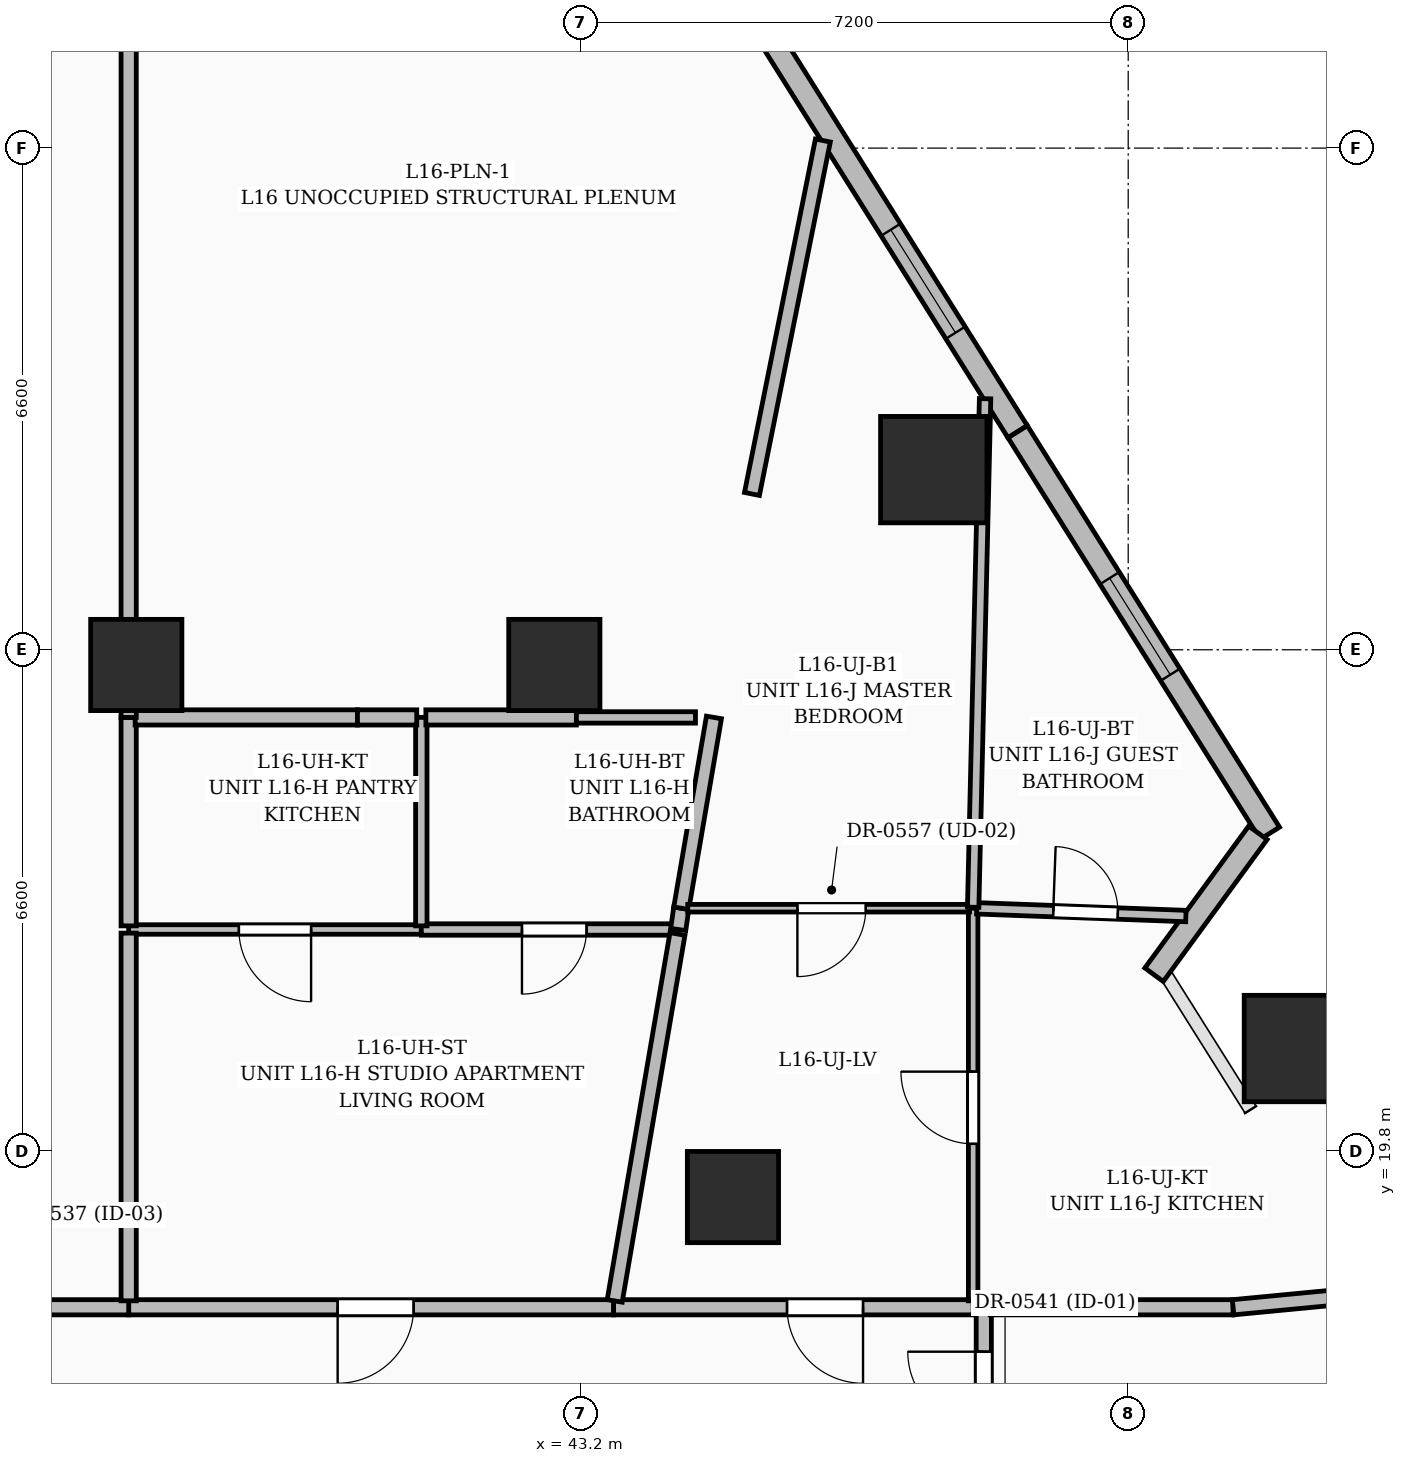
"""IFC4 building model, lengths in metres.
Left out: names, types, materials, properties, quantities, classifications, styles, units other than length and angle.
Written with IfcOpenShell. Run it as: python <this file> out.ifc"""

import sys

from ifc_helpers import new_model, si_unit, direction, frame, frame_2d, origin, origin_2d, place, context, subcontext, project, spatial, rectangle, extrude, element, fill, save


model = new_model("IFC4")
c1 = context("Model", 3, precision=1e-05, world=origin(), true_north=direction((0.0, 1.0)))
c2 = subcontext(c1, "Body", "Model", "MODEL_VIEW")
j1 = project(units=[si_unit("LENGTHUNIT", "METRE"), si_unit("PLANEANGLEUNIT", "RADIAN")], contexts=[c1])
p1 = place(None, origin())
s1 = spatial("IfcSite", under=j1, at=p1, CompositionType="ELEMENT")
p2 = place(p1, origin())
s2 = spatial("IfcBuilding", under=s1, at=p2, CompositionType="ELEMENT")
p3 = place(p2, frame((0.0, 0.0, 67.8)))
s3 = spatial("IfcBuildingStorey", under=s2, at=p3, CompositionType="ELEMENT", Elevation=67.8)
for number, where, z_axis, x_axis in (
    (1, (45.2, 19.2, 0.0), (0.0, 0.0, 1.0), (1.0, 0.0, 0.0)),
    (2, (42.85, 26.2, 0.0), (0.0, 0.0, 1.0), (1.0, 0.0, 0.0)),
    (3, (37.35, 26.2, 0.0), (0.0, 0.0, 1.0), (1.0, 0.0, 0.0)),
):
    element("IfcColumn", number, at=place(p3, frame(where, z_axis=z_axis, x_axis=x_axis)), inside=s3, PredefinedType="COLUMN", context=c2, shape_type="SweptSolid", body=[
        extrude(rectangle(XDim=1.2, YDim=1.2, at=origin_2d()), origin(), (0.0, 0.0, 1.0), 3.6),
    ])
for number, where, z_axis, x_axis in (
    (4, (52.626, 21.154, 0.0), (0.0, 0.0, 1.0), (1.0, 0.0, 0.0)),
    (5, (47.842, 28.77, 0.0), (0.0, 0.0, 1.0), (1.0, 0.0, 0.0)),
):
    element("IfcColumn", number, at=place(p3, frame(where, z_axis=z_axis, x_axis=x_axis)), inside=s3, PredefinedType="COLUMN", context=c2, shape_type="SweptSolid", body=[
        extrude(rectangle(XDim=1.4, YDim=1.4, at=origin_2d()), origin(), (0.0, 0.0, 1.0), 3.6),
    ])
p4 = place(p3, frame((45.627, 34.551, 0.0), z_axis=(0.0, 0.0, 1.0), x_axis=(0.531925449882, -0.846791187819, 0.0)))
e6 = element("IfcWall", 6, at=p4, inside=s3, PredefinedType="SOLIDWALL", context=c2, shape_type="SweptSolid", body=[
    extrude(rectangle(XDim=6.238, YDim=0.3, at=frame_2d((3.119, 0.0))), origin(), (0.0, 0.0, 1.0), 3.35),
])
p5 = place(p4, frame((3.1, 0.0, 0.55)))
e7 = element("IfcOpeningElement", 7, at=p5, cuts=e6, PredefinedType="OPENING", context=c2, shape_type="SweptSolid", body=[
    extrude(rectangle(XDim=1.6, YDim=2.2, at=frame_2d((0.8, 1.1))), frame((0.0, 0.16, 0.0), z_axis=(0.0, -1.0, 0.0), x_axis=(1.0, 0.0, 0.0)), (0.0, 0.0, 1.0), 0.32),
])
p6 = place(p3, frame((48.946, 29.269, 0.0), z_axis=(0.0, 0.0, 1.0), x_axis=(0.531879756562, -0.84681988909, 0.0)))
e8 = element("IfcWall", 8, at=p6, inside=s3, PredefinedType="SOLIDWALL", context=c2, shape_type="SweptSolid", body=[
    extrude(rectangle(XDim=6.238, YDim=0.3, at=frame_2d((3.119, 0.0))), origin(), (0.0, 0.0, 1.0), 3.35),
])
p7 = place(p6, frame((2.275, 0.0, 0.6)))
e9 = element("IfcOpeningElement", 9, at=p7, cuts=e8, PredefinedType="OPENING", context=c2, shape_type="SweptSolid", body=[
    extrude(rectangle(XDim=1.5, YDim=2.1, at=frame_2d((0.75, 1.05))), frame((0.0, 0.16, 0.0), z_axis=(0.0, -1.0, 0.0), x_axis=(1.0, 0.0, 0.0)), (0.0, 0.0, 1.0), 0.32),
])
p8 = place(p3, frame((52.106, 23.992, 0.0), z_axis=(0.0, 0.0, 1.0), x_axis=(-0.590553579903, -0.806998432008, 0.0)))
e10 = element("IfcWall", 10, at=p8, inside=s3, PredefinedType="SOLIDWALL", context=c2, shape_type="SweptSolid", body=[
    extrude(rectangle(XDim=2.313, YDim=0.3, at=frame_2d((1.157, 0.0))), origin(), (0.0, 0.0, 1.0), 2.375),
])
p9 = place(p3, frame((48.5, 15.47, 0.0), z_axis=(0.0, 0.0, 1.0), x_axis=(0.0, 1.0, 0.0)))
e11 = element("IfcWall", 11, at=p9, inside=s3, PredefinedType="PARTITIONING", context=c2, shape_type="SweptSolid", body=[
    extrude(rectangle(XDim=2.28, YDim=0.2, at=frame_2d((1.14, 0.0))), origin(), (0.0, 0.0, 1.0), 2.279),
])
p10 = place(p9, frame((0.696, 0.0, 0.0)))
e12 = element("IfcOpeningElement", 12, at=p10, cuts=e11, PredefinedType="OPENING", context=c2, shape_type="SweptSolid", body=[
    extrude(rectangle(XDim=1.0, YDim=2.2, at=frame_2d((0.5, 1.1))), frame((0.0, 0.11, 0.0), z_axis=(0.0, -1.0, 0.0), x_axis=(1.0, 0.0, 0.0)), (0.0, 0.0, 1.0), 0.22),
])
p11 = place(p3, frame((43.63, 17.75, 0.0), z_axis=(0.0, 0.0, 1.0), x_axis=(-1.0, 0.0, 0.0)))
e13 = element("IfcWall", 13, at=p11, inside=s3, PredefinedType="PARTITIONING", context=c2, shape_type="SweptSolid", body=[
    extrude(rectangle(XDim=6.38, YDim=0.2, at=frame_2d((3.19, 0.0))), origin(), (0.0, 0.0, 1.0), 3.35),
])
p12 = place(p11, frame((2.631, 0.0, 0.0)))
e14 = element("IfcOpeningElement", 14, at=p12, cuts=e13, PredefinedType="OPENING", context=c2, shape_type="SweptSolid", body=[
    extrude(rectangle(XDim=1.0, YDim=2.2, at=frame_2d((0.5, 1.1))), frame((0.0, 0.11, 0.0), z_axis=(0.0, -1.0, 0.0), x_axis=(1.0, 0.0, 0.0)), (0.0, 0.0, 1.0), 0.22),
])
p13 = place(p3, frame((48.36, 17.75, 0.0), z_axis=(0.0, 0.0, 1.0), x_axis=(-1.0, 0.0, 0.0)))
e15 = element("IfcWall", 15, at=p13, inside=s3, PredefinedType="PARTITIONING", context=c2, shape_type="SweptSolid", body=[
    extrude(rectangle(XDim=4.73, YDim=0.2, at=frame_2d((2.365, 0.0))), origin(), (0.0, 0.0, 1.0), 2.309),
])
p14 = place(p13, frame((1.448, 0.0, 0.0)))
e16 = element("IfcOpeningElement", 16, at=p14, cuts=e15, PredefinedType="OPENING", context=c2, shape_type="SweptSolid", body=[
    extrude(rectangle(XDim=1.0, YDim=2.2, at=frame_2d((0.5, 1.1))), frame((0.0, 0.11, 0.0), z_axis=(0.0, -1.0, 0.0), x_axis=(1.0, 0.0, 0.0)), (0.0, 0.0, 1.0), 0.22),
])
p15 = place(p3, frame((37.25, 17.75, 0.0), z_axis=(0.0, 0.0, 1.0), x_axis=(-1.0, 0.0, 0.0)))
e17 = element("IfcWall", 17, at=p15, inside=s3, PredefinedType="PARTITIONING", context=c2, shape_type="SweptSolid", body=[
    extrude(rectangle(XDim=3.19, YDim=0.2, at=frame_2d((1.595, 0.0))), origin(), (0.0, 0.0, 1.0), 2.309),
])
p16 = place(p15, frame((1.086, 0.0, 0.0)))
e18 = element("IfcOpeningElement", 18, at=p16, cuts=e17, PredefinedType="OPENING", context=c2, shape_type="SweptSolid", body=[
    extrude(rectangle(XDim=0.9, YDim=2.1, at=frame_2d((0.45, 1.05))), frame((0.0, 0.11, 0.0), z_axis=(0.0, -1.0, 0.0), x_axis=(1.0, 0.0, 0.0)), (0.0, 0.0, 1.0), 0.22),
])
p17 = place(p3, frame((51.78, 17.75, 0.0), z_axis=(0.0, 0.0, 1.0), x_axis=(-1.0, 0.0, 0.0)))
e19 = element("IfcWall", 19, at=p17, inside=s3, PredefinedType="PARTITIONING", context=c2, shape_type="SweptSolid", body=[
    extrude(rectangle(XDim=3.195, YDim=0.2, at=frame_2d((1.598, 0.0))), origin(), (0.0, 0.0, 1.0), 2.279),
])
p18 = place(p3, frame((55.8, 18.135, 0.0), z_axis=(0.0, 0.0, 1.0), x_axis=(-0.99544506708, -0.095336868139, 0.0)))
e20 = element("IfcWall", 20, at=p18, inside=s3, PredefinedType="PARTITIONING", context=c2, shape_type="SweptSolid", body=[
    extrude(rectangle(XDim=4.038, YDim=0.2, at=frame_2d((2.019, 0.0))), origin(), (0.0, 0.0, 1.0), 2.37),
])
p19 = place(p3, frame((41.1, 22.72, 0.0), z_axis=(0.0, 0.0, 1.0), x_axis=(-1.0, 0.0, 0.0)))
e21 = element("IfcWall", 21, at=p19, inside=s3, PredefinedType="PARTITIONING", context=c2, shape_type="SweptSolid", body=[
    extrude(rectangle(XDim=3.85, YDim=0.125, at=frame_2d((1.925, 0.0))), origin(), (0.0, 0.0, 1.0), 3.35),
])
p20 = place(p19, frame((1.45, 0.0, 0.0)))
e22 = element("IfcOpeningElement", 22, at=p20, cuts=e21, PredefinedType="OPENING", context=c2, shape_type="SweptSolid", body=[
    extrude(rectangle(XDim=0.95, YDim=2.2, at=frame_2d((0.475, 1.1))), frame((0.0, 0.072, 0.0), z_axis=(0.0, -1.0, 0.0), x_axis=(1.0, 0.0, 0.0)), (0.0, 0.0, 1.0), 0.145),
])
p21 = place(p3, frame((44.48, 22.72, 0.0), z_axis=(0.0, 0.0, 1.0), x_axis=(-1.0, 0.0, 0.0)))
e23 = element("IfcWall", 23, at=p21, inside=s3, PredefinedType="PARTITIONING", context=c2, shape_type="SweptSolid", body=[
    extrude(rectangle(XDim=3.38, YDim=0.15, at=frame_2d((1.69, 0.0))), origin(), (0.0, 0.0, 1.0), 2.309),
])
p22 = place(p21, frame((1.206, 0.0, 0.0)))
e24 = element("IfcOpeningElement", 24, at=p22, cuts=e23, PredefinedType="OPENING", context=c2, shape_type="SweptSolid", body=[
    extrude(rectangle(XDim=0.85, YDim=2.1, at=frame_2d((0.425, 1.05))), frame((0.0, 0.085, 0.0), z_axis=(0.0, -1.0, 0.0), x_axis=(1.0, 0.0, 0.0)), (0.0, 0.0, 1.0), 0.17),
])
p23 = place(p3, frame((43.644, 17.834, 0.0), z_axis=(0.0, 0.0, 1.0), x_axis=(0.168601275726, 0.985684335791, 0.0)))
e25 = element("IfcWall", 25, at=p23, inside=s3, PredefinedType="PARTITIONING", context=c2, shape_type="SweptSolid", body=[
    extrude(rectangle(XDim=4.897, YDim=0.2, at=frame_2d((2.449, 0.0))), origin(), (0.0, 0.0, 1.0), 2.309),
])
p24 = place(p3, frame((37.25, 22.673, 0.0), z_axis=(0.0, 0.0, 1.0), x_axis=(0.0, -1.0, 0.0)))
e26 = element("IfcWall", 26, at=p24, inside=s3, PredefinedType="PARTITIONING", context=c2, shape_type="SweptSolid", body=[
    extrude(rectangle(XDim=4.838, YDim=0.2, at=frame_2d((2.419, 0.0))), origin(), (0.0, 0.0, 1.0), 3.35),
])
p25 = place(p3, frame((41.1, 22.768, 0.0), z_axis=(0.0, 0.0, 1.0), x_axis=(0.0, 1.0, 0.0)))
e27 = element("IfcWall", 27, at=p25, inside=s3, PredefinedType="PARTITIONING", context=c2, shape_type="SweptSolid", body=[
    extrude(rectangle(XDim=2.742, YDim=0.15, at=frame_2d((1.371, 0.0))), origin(), (0.0, 0.0, 1.0), 3.35),
])
p26 = place(p3, frame((37.25, 25.51, 0.0), z_axis=(0.0, 0.0, 1.0), x_axis=(0.0, -1.0, 0.0)))
e28 = element("IfcWall", 28, at=p26, inside=s3, PredefinedType="PARTITIONING", context=c2, shape_type="SweptSolid", body=[
    extrude(rectangle(XDim=2.742, YDim=0.2, at=frame_2d((1.371, 0.0))), origin(), (0.0, 0.0, 1.0), 2.309),
])
p27 = place(p3, frame((40.26, 25.51, 0.0), z_axis=(0.0, 0.0, 1.0), x_axis=(-1.0, 0.0, 0.0)))
e29 = element("IfcWall", 29, at=p27, inside=s3, PredefinedType="PARTITIONING", context=c2, shape_type="SweptSolid", body=[
    extrude(rectangle(XDim=2.925, YDim=0.2, at=frame_2d((1.462, 0.0))), origin(), (0.0, 0.0, 1.0), 3.35),
])
p28 = place(p3, frame((44.48, 22.72, 0.0), z_axis=(0.0, 0.0, 1.0), x_axis=(0.141542183877, 0.989932225045, 0.0)))
e30 = element("IfcWall", 30, at=p28, inside=s3, PredefinedType="PARTITIONING", context=c2, shape_type="SweptSolid", body=[
    extrude(rectangle(XDim=0.283, YDim=0.2, at=frame_2d((0.142, 0.0))), origin(), (0.0, 0.0, 1.0), 3.35),
])
p29 = place(p3, frame((44.52, 23.0, 0.0), z_axis=(0.0, 0.0, 1.0), x_axis=(0.168828104549, 0.985645509864, 0.0)))
e31 = element("IfcWall", 31, at=p29, inside=s3, PredefinedType="PARTITIONING", context=c2, shape_type="SweptSolid", body=[
    extrude(rectangle(XDim=2.547, YDim=0.2, at=frame_2d((1.273, 0.0))), origin(), (0.0, 0.0, 1.0), 3.35),
])
p30 = place(p3, frame((43.14, 25.51, 0.0), z_axis=(0.0, 0.0, 1.0), x_axis=(-1.0, 0.0, 0.0)))
e32 = element("IfcWall", 32, at=p30, inside=s3, PredefinedType="PARTITIONING", context=c2, shape_type="SweptSolid", body=[
    extrude(rectangle(XDim=1.98, YDim=0.2, at=frame_2d((0.99, 0.0))), origin(), (0.0, 0.0, 1.0), 2.309),
])
p31 = place(p3, frame((48.36, 17.835, 0.0), z_axis=(0.0, 0.0, 1.0), x_axis=(0.0, 1.0, 0.0)))
e33 = element("IfcWall", 33, at=p31, inside=s3, PredefinedType="PARTITIONING", context=c2, shape_type="SweptSolid", body=[
    extrude(rectangle(XDim=5.165, YDim=0.125, at=frame_2d((2.583, 0.0))), origin(), (0.0, 0.0, 1.0), 2.787),
])
p32 = place(p31, frame((2.065, 0.0, 0.0)))
e34 = element("IfcOpeningElement", 34, at=p32, cuts=e33, PredefinedType="OPENING", context=c2, shape_type="SweptSolid", body=[
    extrude(rectangle(XDim=0.95, YDim=2.2, at=frame_2d((0.475, 1.1))), frame((0.0, 0.072, 0.0), z_axis=(0.0, -1.0, 0.0), x_axis=(1.0, 0.0, 0.0)), (0.0, 0.0, 1.0), 0.145),
])
p33 = place(p3, frame((48.312, 23.0, 0.0), z_axis=(0.0, 0.0, 1.0), x_axis=(-1.0, 0.0, 0.0)))
e35 = element("IfcWall", 35, at=p33, inside=s3, PredefinedType="PARTITIONING", context=c2, shape_type="SweptSolid", body=[
    extrude(rectangle(XDim=3.708, YDim=0.1, at=frame_2d((1.854, 0.0))), origin(), (0.0, 0.0, 1.0), 2.279),
])
p34 = place(p33, frame((1.365, 0.0, 0.0)))
e36 = element("IfcOpeningElement", 36, at=p34, cuts=e35, PredefinedType="OPENING", context=c2, shape_type="SweptSolid", body=[
    extrude(rectangle(XDim=0.9, YDim=2.15, at=frame_2d((0.45, 1.075))), frame((0.0, 0.06, 0.0), z_axis=(0.0, -1.0, 0.0), x_axis=(1.0, 0.0, 0.0)), (0.0, 0.0, 1.0), 0.12),
])
p35 = place(p3, frame((48.407, 22.999, 0.0), z_axis=(0.0, 0.0, 1.0), x_axis=(0.999319441734, -0.036887035294, 0.0)))
e37 = element("IfcWall", 37, at=p35, inside=s3, PredefinedType="PARTITIONING", context=c2, shape_type="SweptSolid", body=[
    extrude(rectangle(XDim=2.753, YDim=0.15, at=frame_2d((1.377, 0.0))), origin(), (0.0, 0.0, 1.0), 2.37),
])
p36 = place(p35, frame((1.007, 0.0, 0.0)))
e38 = element("IfcOpeningElement", 38, at=p36, cuts=e37, PredefinedType="OPENING", context=c2, shape_type="SweptSolid", body=[
    extrude(rectangle(XDim=0.85, YDim=2.1, at=frame_2d((0.425, 1.05))), frame((0.0, 0.085, 0.0), z_axis=(0.0, -1.0, 0.0), x_axis=(1.0, 0.0, 0.0)), (0.0, 0.0, 1.0), 0.17),
])
p37 = place(p3, frame((48.517, 29.703, 0.0), z_axis=(0.0, 0.0, 1.0), x_axis=(-0.023457271652, -0.999724840347, 0.0)))
e39 = element("IfcWall", 39, at=p37, inside=s3, PredefinedType="PARTITIONING", context=c2, shape_type="SweptSolid", body=[
    extrude(rectangle(XDim=6.692, YDim=0.15, at=frame_2d((3.346, 0.0))), origin(), (0.0, 0.0, 1.0), 2.37),
])
p38 = place(p3, frame((46.383, 33.1, 0.0), z_axis=(0.0, 0.0, 1.0), x_axis=(-0.196739742163, -0.980455748034, 0.0)))
e40 = element("IfcWall", 40, at=p38, inside=s3, PredefinedType="PARTITIONING", context=c2, shape_type="SweptSolid", body=[
    extrude(rectangle(XDim=4.743, YDim=0.2, at=frame_2d((2.372, 0.0))), origin(), (0.0, 0.0, 1.0), 2.37),
])
p39 = place(p3, frame((37.25, 25.51, 0.0), z_axis=(0.0, 0.0, 1.0), x_axis=(0.0, 1.0, 0.0)))
e41 = element("IfcWall", 41, at=p39, inside=s3, PredefinedType="PARTITIONING", context=c2, shape_type="SweptSolid", body=[
    extrude(rectangle(XDim=12.14, YDim=0.2, at=frame_2d((6.07, 0.0))), origin(), (0.0, 0.0, 1.0), 2.279),
])
p40 = place(p3, frame((41.04, 25.51, 0.0), z_axis=(0.0, 0.0, 1.0), x_axis=(-1.0, 0.0, 0.0)))
e42 = element("IfcWall", 42, at=p40, inside=s3, PredefinedType="PARTITIONING", context=c2, shape_type="SweptSolid", body=[
    extrude(rectangle(XDim=0.78, YDim=0.2, at=frame_2d((0.39, 0.0))), origin(), (0.0, 0.0, 1.0), 3.35),
])
p41 = place(p3, frame((44.707, 25.51, 0.0), z_axis=(0.0, 0.0, 1.0), x_axis=(-1.0, 0.0, 0.0)))
e43 = element("IfcWall", 43, at=p41, inside=s3, PredefinedType="PARTITIONING", context=c2, shape_type="SweptSolid", body=[
    extrude(rectangle(XDim=1.567, YDim=0.15, at=frame_2d((0.784, 0.0))), origin(), (0.0, 0.0, 1.0), 2.309),
])
p42 = place(p5, origin())
e44 = element("IfcWindow", 44, at=p42, inside=s3, PartitioningType="SINGLE_PANEL", PredefinedType="WINDOW", context=c2, shape_type="SweptSolid", body=[
    extrude(rectangle(XDim=1.6, YDim=2.2, at=frame_2d((0.8, 1.1))), frame((0.0, 0.03, 0.0), z_axis=(0.0, -1.0, 0.0), x_axis=(1.0, 0.0, 0.0)), (0.0, 0.0, 1.0), 0.06),
])
fill(e7, e44)
p43 = place(p7, origin())
e45 = element("IfcWindow", 45, at=p43, inside=s3, PartitioningType="SINGLE_PANEL", PredefinedType="WINDOW", context=c2, shape_type="SweptSolid", body=[
    extrude(rectangle(XDim=1.5, YDim=2.1, at=frame_2d((0.75, 1.05))), frame((0.0, 0.03, 0.0), z_axis=(0.0, -1.0, 0.0), x_axis=(1.0, 0.0, 0.0)), (0.0, 0.0, 1.0), 0.06),
])
fill(e9, e45)
p44 = place(p10, origin())
e46 = element("IfcDoor", 46, at=p44, inside=s3, OperationType="SINGLE_SWING_RIGHT", PredefinedType="DOOR", context=c2, shape_type="SweptSolid", body=[
    extrude(rectangle(XDim=1.0, YDim=2.2, at=frame_2d((0.5, 1.1))), frame((0.0, 0.025, 0.0), z_axis=(0.0, -1.0, 0.0), x_axis=(1.0, 0.0, 0.0)), (0.0, 0.0, 1.0), 0.05),
])
fill(e12, e46)
p45 = place(p12, origin())
e47 = element("IfcDoor", 47, at=p45, inside=s3, OperationType="SINGLE_SWING_RIGHT", PredefinedType="DOOR", context=c2, shape_type="SweptSolid", body=[
    extrude(rectangle(XDim=1.0, YDim=2.2, at=frame_2d((0.5, 1.1))), frame((0.0, 0.025, 0.0), z_axis=(0.0, -1.0, 0.0), x_axis=(1.0, 0.0, 0.0)), (0.0, 0.0, 1.0), 0.05),
])
fill(e14, e47)
p46 = place(p20, origin())
e48 = element("IfcDoor", 48, at=p46, inside=s3, OperationType="SINGLE_SWING_LEFT", PredefinedType="DOOR", context=c2, shape_type="SweptSolid", body=[
    extrude(rectangle(XDim=0.95, YDim=2.2, at=frame_2d((0.475, 1.1))), frame((0.0, 0.025, 0.0), z_axis=(0.0, -1.0, 0.0), x_axis=(1.0, 0.0, 0.0)), (0.0, 0.0, 1.0), 0.05),
])
fill(e22, e48)
p47 = place(p22, origin())
e49 = element("IfcDoor", 49, at=p47, inside=s3, OperationType="SINGLE_SWING_RIGHT", PredefinedType="DOOR", context=c2, shape_type="SweptSolid", body=[
    extrude(rectangle(XDim=0.85, YDim=2.1, at=frame_2d((0.425, 1.05))), frame((0.0, 0.025, 0.0), z_axis=(0.0, -1.0, 0.0), x_axis=(1.0, 0.0, 0.0)), (0.0, 0.0, 1.0), 0.05),
])
fill(e24, e49)
p48 = place(p14, origin())
e50 = element("IfcDoor", 50, at=p48, inside=s3, OperationType="SINGLE_SWING_LEFT", PredefinedType="DOOR", context=c2, shape_type="SweptSolid", body=[
    extrude(rectangle(XDim=1.0, YDim=2.2, at=frame_2d((0.5, 1.1))), frame((0.0, 0.025, 0.0), z_axis=(0.0, -1.0, 0.0), x_axis=(1.0, 0.0, 0.0)), (0.0, 0.0, 1.0), 0.05),
])
fill(e16, e50)
p49 = place(p32, origin())
e51 = element("IfcDoor", 51, at=p49, inside=s3, OperationType="SINGLE_SWING_RIGHT", PredefinedType="DOOR", context=c2, shape_type="SweptSolid", body=[
    extrude(rectangle(XDim=0.95, YDim=2.2, at=frame_2d((0.475, 1.1))), frame((0.0, 0.025, 0.0), z_axis=(0.0, -1.0, 0.0), x_axis=(1.0, 0.0, 0.0)), (0.0, 0.0, 1.0), 0.05),
])
fill(e34, e51)
p50 = place(p36, origin())
e52 = element("IfcDoor", 52, at=p50, inside=s3, OperationType="SINGLE_SWING_LEFT", PredefinedType="DOOR", context=c2, shape_type="SweptSolid", body=[
    extrude(rectangle(XDim=0.85, YDim=2.1, at=frame_2d((0.425, 1.05))), frame((0.0, 0.025, 0.0), z_axis=(0.0, -1.0, 0.0), x_axis=(1.0, 0.0, 0.0)), (0.0, 0.0, 1.0), 0.05),
])
fill(e38, e52)
p51 = place(p34, origin())
e53 = element("IfcDoor", 53, at=p51, inside=s3, OperationType="SINGLE_SWING_RIGHT", PredefinedType="DOOR", context=c2, shape_type="SweptSolid", body=[
    extrude(rectangle(XDim=0.9, YDim=2.15, at=frame_2d((0.45, 1.075))), frame((0.0, 0.025, 0.0), z_axis=(0.0, -1.0, 0.0), x_axis=(1.0, 0.0, 0.0)), (0.0, 0.0, 1.0), 0.05),
])
fill(e36, e53)
save(model, sys.argv[1])
